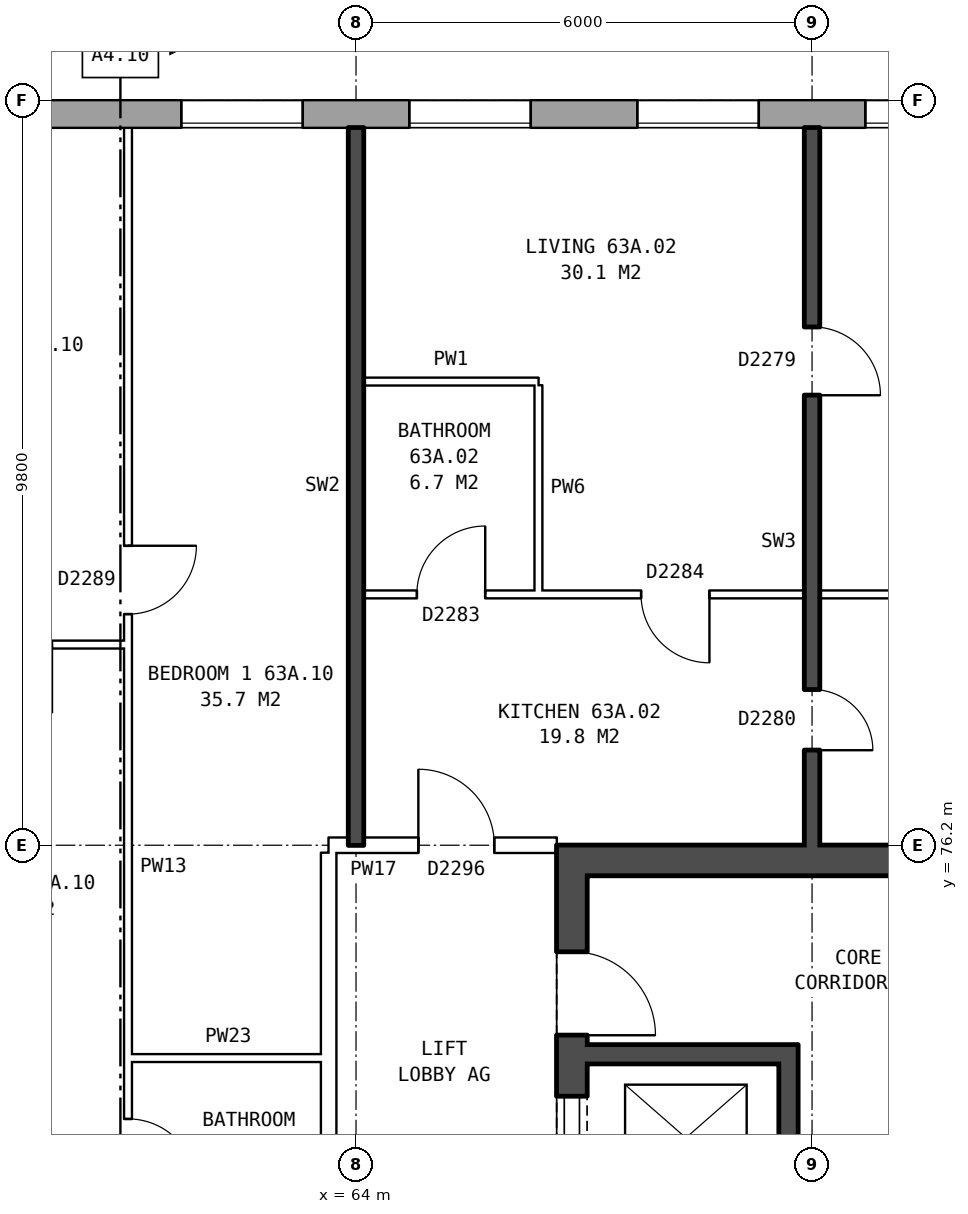
"""IFC4 building model, lengths in metres.
Left out: names, types, materials, properties, quantities, classifications, styles, units other than length and angle.
Written with IfcOpenShell. Run it as: python <this file> out.ifc"""

import sys

from ifc_helpers import new_model, si_unit, direction, frame, frame_2d, origin, place, context, subcontext, project, spatial, rectangle, extrude, element, fill, save


model = new_model("IFC4")
c1 = context("Model", 3, precision=1e-05, world=origin(), true_north=direction((0.0, 1.0)))
c2 = subcontext(c1, "Body", "Model", "MODEL_VIEW")
j1 = project(units=[si_unit("LENGTHUNIT", "METRE"), si_unit("PLANEANGLEUNIT", "RADIAN")], contexts=[c1])
p1 = place(None, origin())
s1 = spatial("IfcSite", under=j1, at=p1, CompositionType="ELEMENT")
p2 = place(p1, origin())
s2 = spatial("IfcBuilding", under=s1, at=p2, CompositionType="ELEMENT")
p3 = place(p2, frame((0.0, 0.0, 224.5)))
s3 = spatial("IfcBuildingStorey", under=s2, at=p3, CompositionType="ELEMENT", Elevation=224.5)
p4 = place(p3, frame((74.95, 85.82, 0.0), z_axis=(0.0, 0.0, 1.0), x_axis=(-1.0, 0.0, 0.0)))
e1 = element("IfcWall", 1, at=p4, inside=s3, PredefinedType="STANDARD", context=c2, shape_type="SweptSolid", body=[
    extrude(rectangle(XDim=39.875, YDim=0.36, at=frame_2d((19.938, 0.0))), origin(), (0.0, 0.0, 1.0), 2.85),
])
p5 = place(p4, frame((2.65, 0.0, 0.8)))
e2 = element("IfcOpeningElement", 2, at=p5, cuts=e1, PredefinedType="OPENING", context=c2, shape_type="SweptSolid", body=[
    extrude(rectangle(XDim=1.6, YDim=1.8, at=frame_2d((0.8, 0.9))), frame((0.0, 0.19, 0.0), z_axis=(0.0, -1.0, 0.0), x_axis=(1.0, 0.0, 0.0)), (0.0, 0.0, 1.0), 0.38),
])
p6 = place(p4, frame((5.65, 0.0, 0.8)))
e3 = element("IfcOpeningElement", 3, at=p6, cuts=e1, PredefinedType="OPENING", context=c2, shape_type="SweptSolid", body=[
    extrude(rectangle(XDim=1.6, YDim=1.8, at=frame_2d((0.8, 0.9))), frame((0.0, 0.19, 0.0), z_axis=(0.0, -1.0, 0.0), x_axis=(1.0, 0.0, 0.0)), (0.0, 0.0, 1.0), 0.38),
])
p7 = place(p4, frame((8.65, 0.0, 0.8)))
e4 = element("IfcOpeningElement", 4, at=p7, cuts=e1, PredefinedType="OPENING", context=c2, shape_type="SweptSolid", body=[
    extrude(rectangle(XDim=1.6, YDim=1.8, at=frame_2d((0.8, 0.9))), frame((0.0, 0.19, 0.0), z_axis=(0.0, -1.0, 0.0), x_axis=(1.0, 0.0, 0.0)), (0.0, 0.0, 1.0), 0.38),
])
p8 = place(p4, frame((11.65, 0.0, 0.8)))
e5 = element("IfcOpeningElement", 5, at=p8, cuts=e1, PredefinedType="OPENING", context=c2, shape_type="SweptSolid", body=[
    extrude(rectangle(XDim=1.6, YDim=1.8, at=frame_2d((0.8, 0.9))), frame((0.0, 0.19, 0.0), z_axis=(0.0, -1.0, 0.0), x_axis=(1.0, 0.0, 0.0)), (0.0, 0.0, 1.0), 0.38),
])
p9 = place(p4, frame((15.55, 0.0, 0.8)))
e6 = element("IfcOpeningElement", 6, at=p9, cuts=e1, PredefinedType="OPENING", context=c2, shape_type="SweptSolid", body=[
    extrude(rectangle(XDim=1.2, YDim=1.8, at=frame_2d((0.6, 0.9))), frame((0.0, 0.19, 0.0), z_axis=(0.0, -1.0, 0.0), x_axis=(1.0, 0.0, 0.0)), (0.0, 0.0, 1.0), 0.38),
])
p10 = place(p4, frame((17.65, 0.0, 0.8)))
e7 = element("IfcOpeningElement", 7, at=p10, cuts=e1, PredefinedType="OPENING", context=c2, shape_type="SweptSolid", body=[
    extrude(rectangle(XDim=1.6, YDim=1.8, at=frame_2d((0.8, 0.9))), frame((0.0, 0.19, 0.0), z_axis=(0.0, -1.0, 0.0), x_axis=(1.0, 0.0, 0.0)), (0.0, 0.0, 1.0), 0.38),
])
p11 = place(p4, frame((20.65, 0.0, 0.8)))
e8 = element("IfcOpeningElement", 8, at=p11, cuts=e1, PredefinedType="OPENING", context=c2, shape_type="SweptSolid", body=[
    extrude(rectangle(XDim=1.6, YDim=1.8, at=frame_2d((0.8, 0.9))), frame((0.0, 0.19, 0.0), z_axis=(0.0, -1.0, 0.0), x_axis=(1.0, 0.0, 0.0)), (0.0, 0.0, 1.0), 0.38),
])
p12 = place(p4, frame((23.65, 0.0, 0.8)))
e9 = element("IfcOpeningElement", 9, at=p12, cuts=e1, PredefinedType="OPENING", context=c2, shape_type="SweptSolid", body=[
    extrude(rectangle(XDim=1.6, YDim=1.8, at=frame_2d((0.8, 0.9))), frame((0.0, 0.19, 0.0), z_axis=(0.0, -1.0, 0.0), x_axis=(1.0, 0.0, 0.0)), (0.0, 0.0, 1.0), 0.38),
])
p13 = place(p4, frame((26.1, 0.0, 0.25)))
e10 = element("IfcOpeningElement", 10, at=p13, cuts=e1, PredefinedType="OPENING", context=c2, shape_type="SweptSolid", body=[
    extrude(rectangle(XDim=0.8, YDim=1.5, at=frame_2d((0.4, 0.75))), frame((0.0, 0.19, 0.0), z_axis=(0.0, -1.0, 0.0), x_axis=(1.0, 0.0, 0.0)), (0.0, 0.0, 1.0), 0.38),
])
p14 = place(p4, frame((29.65, 0.0, 0.8)))
e11 = element("IfcOpeningElement", 11, at=p14, cuts=e1, PredefinedType="OPENING", context=c2, shape_type="SweptSolid", body=[
    extrude(rectangle(XDim=1.6, YDim=1.8, at=frame_2d((0.8, 0.9))), frame((0.0, 0.19, 0.0), z_axis=(0.0, -1.0, 0.0), x_axis=(1.0, 0.0, 0.0)), (0.0, 0.0, 1.0), 0.38),
])
p15 = place(p4, frame((32.65, 0.0, 0.8)))
e12 = element("IfcOpeningElement", 12, at=p15, cuts=e1, PredefinedType="OPENING", context=c2, shape_type="SweptSolid", body=[
    extrude(rectangle(XDim=1.6, YDim=1.8, at=frame_2d((0.8, 0.9))), frame((0.0, 0.19, 0.0), z_axis=(0.0, -1.0, 0.0), x_axis=(1.0, 0.0, 0.0)), (0.0, 0.0, 1.0), 0.38),
])
p16 = place(p4, frame((35.65, 0.0, 0.8)))
e13 = element("IfcOpeningElement", 13, at=p16, cuts=e1, PredefinedType="OPENING", context=c2, shape_type="SweptSolid", body=[
    extrude(rectangle(XDim=1.6, YDim=1.8, at=frame_2d((0.8, 0.9))), frame((0.0, 0.19, 0.0), z_axis=(0.0, -1.0, 0.0), x_axis=(1.0, 0.0, 0.0)), (0.0, 0.0, 1.0), 0.38),
])
p17 = place(p4, frame((28.15, 0.0, 1.65)))
e14 = element("IfcOpeningElement", 14, at=p17, cuts=e1, PredefinedType="OPENING", context=c2, shape_type="SweptSolid", body=[
    extrude(rectangle(XDim=0.6, YDim=0.9, at=frame_2d((0.3, 0.45))), frame((0.0, 0.19, 0.0), z_axis=(0.0, -1.0, 0.0), x_axis=(1.0, 0.0, 0.0)), (0.0, 0.0, 1.0), 0.38),
])
p18 = place(p3, frame((66.84, 63.8, 0.0), z_axis=(0.0, 0.0, 1.0), x_axis=(0.0, 1.0, 0.0)))
e15 = element("IfcWall", 15, at=p18, inside=s3, PredefinedType="SHEAR", context=c2, shape_type="SweptSolid", body=[
    extrude(rectangle(XDim=12.4, YDim=0.4, at=frame_2d((6.2, 0.0))), origin(), (0.0, 0.0, 1.0), 2.85),
])
p19 = place(p18, frame((1.325, 0.0, 0.0)))
e16 = element("IfcOpeningElement", 16, at=p19, cuts=e15, PredefinedType="OPENING", context=c2, shape_type="SweptSolid", body=[
    extrude(rectangle(XDim=1.1, YDim=2.1, at=frame_2d((0.55, 1.05))), frame((0.0, 0.21, 0.0), z_axis=(0.0, -1.0, 0.0), x_axis=(1.0, 0.0, 0.0)), (0.0, 0.0, 1.0), 0.42),
])
p20 = place(p18, frame((3.6, 0.0, 0.0)))
e17 = element("IfcOpeningElement", 17, at=p20, cuts=e15, PredefinedType="OPENING", context=c2, shape_type="SweptSolid", body=[
    extrude(rectangle(XDim=1.1, YDim=2.1, at=frame_2d((0.55, 1.05))), frame((0.0, 0.21, 0.0), z_axis=(0.0, -1.0, 0.0), x_axis=(1.0, 0.0, 0.0)), (0.0, 0.0, 1.0), 0.42),
])
p21 = place(p18, frame((5.8, 0.0, 0.0)))
e18 = element("IfcOpeningElement", 18, at=p21, cuts=e15, PredefinedType="OPENING", context=c2, shape_type="SweptSolid", body=[
    extrude(rectangle(XDim=1.1, YDim=2.1, at=frame_2d((0.55, 1.05))), frame((0.0, 0.21, 0.0), z_axis=(0.0, -1.0, 0.0), x_axis=(1.0, 0.0, 0.0)), (0.0, 0.0, 1.0), 0.42),
])
p22 = place(p18, frame((8.0, 0.0, 0.0)))
e19 = element("IfcOpeningElement", 19, at=p22, cuts=e15, PredefinedType="OPENING", context=c2, shape_type="SweptSolid", body=[
    extrude(rectangle(XDim=1.1, YDim=2.1, at=frame_2d((0.55, 1.05))), frame((0.0, 0.21, 0.0), z_axis=(0.0, -1.0, 0.0), x_axis=(1.0, 0.0, 0.0)), (0.0, 0.0, 1.0), 0.42),
])
p23 = place(p18, frame((9.9, 0.0, 0.0)))
e20 = element("IfcOpeningElement", 20, at=p23, cuts=e15, PredefinedType="OPENING", context=c2, shape_type="SweptSolid", body=[
    extrude(rectangle(XDim=1.1, YDim=2.1, at=frame_2d((0.55, 1.05))), frame((0.0, 0.21, 0.0), z_axis=(0.0, -1.0, 0.0), x_axis=(1.0, 0.0, 0.0)), (0.0, 0.0, 1.0), 0.42),
])
p24 = place(p3, frame((67.04, 76.0, 0.0), z_axis=(0.0, 0.0, 1.0), x_axis=(1.0, 0.0, 0.0)))
e21 = element("IfcWall", 21, at=p24, inside=s3, PredefinedType="SHEAR", context=c2, shape_type="SweptSolid", body=[
    extrude(rectangle(XDim=8.2, YDim=0.4, at=frame_2d((4.1, 0.0))), origin(), (0.0, 0.0, 1.0), 2.85),
])
p25 = place(p3, frame((67.04, 73.45, 0.0), z_axis=(0.0, 0.0, 1.0), x_axis=(1.0, 0.0, 0.0)))
e22 = element("IfcWall", 22, at=p25, inside=s3, PredefinedType="SHEAR", context=c2, shape_type="SweptSolid", body=[
    extrude(rectangle(XDim=2.525, YDim=0.25, at=frame_2d((1.262, 0.0))), origin(), (0.0, 0.0, 1.0), 2.85),
])
p26 = place(p3, frame((69.69, 66.975, 0.0), z_axis=(0.0, 0.0, 1.0), x_axis=(0.0, 1.0, 0.0)))
e23 = element("IfcWall", 23, at=p26, inside=s3, PredefinedType="SHEAR", context=c2, shape_type="SweptSolid", body=[
    extrude(rectangle(XDim=6.6, YDim=0.25, at=frame_2d((3.3, 0.0))), origin(), (0.0, 0.0, 1.0), 2.85),
])
p27 = place(p3, frame((63.64, 63.9, 0.0), z_axis=(0.0, 0.0, 1.0), x_axis=(0.0, 1.0, 0.0)))
e24 = element("IfcWall", 24, at=p27, inside=s3, PredefinedType="PARTITIONING", context=c2, shape_type="SweptSolid", body=[
    extrude(rectangle(XDim=12.2, YDim=0.2, at=frame_2d((6.1, 0.0))), origin(), (0.0, 0.0, 1.0), 2.85),
])
p28 = place(p27, frame((5.1, 0.0, 0.0)))
e25 = element("IfcOpeningElement", 25, at=p28, cuts=e24, PredefinedType="OPENING", context=c2, shape_type="SweptSolid", body=[
    extrude(rectangle(XDim=2.0, YDim=2.1, at=frame_2d((1.0, 1.05))), frame((0.0, 0.11, 0.0), z_axis=(0.0, -1.0, 0.0), x_axis=(1.0, 0.0, 0.0)), (0.0, 0.0, 1.0), 0.22),
])
p29 = place(p3, frame((61.0, 73.4, 0.0), z_axis=(0.0, 0.0, 1.0), x_axis=(1.0, 0.0, 0.0)))
e26 = element("IfcWall", 26, at=p29, inside=s3, PredefinedType="PARTITIONING", context=c2, shape_type="SweptSolid", body=[
    extrude(rectangle(XDim=2.64, YDim=0.1, at=frame_2d((1.32, 0.0))), origin(), (0.0, 0.0, 1.0), 2.85),
])
p30 = place(p3, frame((63.64, 76.2, 0.0), z_axis=(0.0, 0.0, 1.0), x_axis=(1.0, 0.0, 0.0)))
e27 = element("IfcWall", 27, at=p30, inside=s3, PredefinedType="PARTITIONING", context=c2, shape_type="SweptSolid", body=[
    extrude(rectangle(XDim=3.0, YDim=0.2, at=frame_2d((1.5, 0.0))), origin(), (0.0, 0.0, 1.0), 2.85),
])
p31 = place(p30, frame((1.18, 0.0, 0.0)))
e28 = element("IfcOpeningElement", 28, at=p31, cuts=e27, PredefinedType="OPENING", context=c2, shape_type="SweptSolid", body=[
    extrude(rectangle(XDim=1.0, YDim=2.1, at=frame_2d((0.5, 1.05))), frame((0.0, 0.11, 0.0), z_axis=(0.0, -1.0, 0.0), x_axis=(1.0, 0.0, 0.0)), (0.0, 0.0, 1.0), 0.22),
])
p32 = place(p3, frame((58.1, 78.84, 0.0), z_axis=(0.0, 0.0, 1.0), x_axis=(1.0, 0.0, 0.0)))
e29 = element("IfcWall", 29, at=p32, inside=s3, PredefinedType="PARTITIONING", context=c2, shape_type="SweptSolid", body=[
    extrude(rectangle(XDim=2.9, YDim=0.1, at=frame_2d((1.45, 0.0))), origin(), (0.0, 0.0, 1.0), 2.85),
])
p33 = place(p32, frame((1.0, 0.0, 0.0)))
e30 = element("IfcOpeningElement", 30, at=p33, cuts=e29, PredefinedType="OPENING", context=c2, shape_type="SweptSolid", body=[
    extrude(rectangle(XDim=0.9, YDim=2.1, at=frame_2d((0.45, 1.05))), frame((0.0, 0.06, 0.0), z_axis=(0.0, -1.0, 0.0), x_axis=(1.0, 0.0, 0.0)), (0.0, 0.0, 1.0), 0.12),
])
p34 = place(p3, frame((64.1, 79.5, 0.0), z_axis=(0.0, 0.0, 1.0), x_axis=(1.0, 0.0, 0.0)))
e31 = element("IfcWall", 31, at=p34, inside=s3, PredefinedType="PARTITIONING", context=c2, shape_type="SweptSolid", body=[
    extrude(rectangle(XDim=11.8, YDim=0.1, at=frame_2d((5.9, 0.0))), origin(), (0.0, 0.0, 1.0), 2.85),
])
p35 = place(p34, frame((3.65, 0.0, 0.0)))
e32 = element("IfcOpeningElement", 32, at=p35, cuts=e31, PredefinedType="OPENING", context=c2, shape_type="SweptSolid", body=[
    extrude(rectangle(XDim=0.9, YDim=2.1, at=frame_2d((0.45, 1.05))), frame((0.0, 0.06, 0.0), z_axis=(0.0, -1.0, 0.0), x_axis=(1.0, 0.0, 0.0)), (0.0, 0.0, 1.0), 0.12),
])
p36 = place(p34, frame((0.7, 0.0, 0.0)))
e33 = element("IfcOpeningElement", 33, at=p36, cuts=e31, PredefinedType="OPENING", context=c2, shape_type="SweptSolid", body=[
    extrude(rectangle(XDim=0.9, YDim=2.1, at=frame_2d((0.45, 1.05))), frame((0.0, 0.06, 0.0), z_axis=(0.0, -1.0, 0.0), x_axis=(1.0, 0.0, 0.0)), (0.0, 0.0, 1.0), 0.12),
])
p37 = place(p3, frame((64.1, 82.3, 0.0), z_axis=(0.0, 0.0, 1.0), x_axis=(1.0, 0.0, 0.0)))
e34 = element("IfcWall", 34, at=p37, inside=s3, PredefinedType="PARTITIONING", context=c2, shape_type="SweptSolid", body=[
    extrude(rectangle(XDim=2.3, YDim=0.1, at=frame_2d((1.15, 0.0))), origin(), (0.0, 0.0, 1.0), 2.85),
])
p38 = place(p3, frame((61.0, 71.3, 0.0), z_axis=(0.0, 0.0, 1.0), x_axis=(0.0, 1.0, 0.0)))
e35 = element("IfcWall", 35, at=p38, inside=s3, PredefinedType="PARTITIONING", context=c2, shape_type="SweptSolid", body=[
    extrude(rectangle(XDim=14.34, YDim=0.1, at=frame_2d((7.17, 0.0))), origin(), (0.0, 0.0, 1.0), 2.85),
])
p39 = place(p38, frame((7.94, 0.0, 0.0)))
e36 = element("IfcOpeningElement", 36, at=p39, cuts=e35, PredefinedType="OPENING", context=c2, shape_type="SweptSolid", body=[
    extrude(rectangle(XDim=0.9, YDim=2.1, at=frame_2d((0.45, 1.05))), frame((0.0, 0.06, 0.0), z_axis=(0.0, -1.0, 0.0), x_axis=(1.0, 0.0, 0.0)), (0.0, 0.0, 1.0), 0.12),
])
p40 = place(p38, frame((0.4, 0.0, 0.0)))
e37 = element("IfcOpeningElement", 37, at=p40, cuts=e35, PredefinedType="OPENING", context=c2, shape_type="SweptSolid", body=[
    extrude(rectangle(XDim=0.9, YDim=2.1, at=frame_2d((0.45, 1.05))), frame((0.0, 0.06, 0.0), z_axis=(0.0, -1.0, 0.0), x_axis=(1.0, 0.0, 0.0)), (0.0, 0.0, 1.0), 0.12),
])
p41 = place(p3, frame((64.0, 76.2, 0.0), z_axis=(0.0, 0.0, 1.0), x_axis=(0.0, 1.0, 0.0)))
e38 = element("IfcWall", 38, at=p41, inside=s3, PredefinedType="SOLIDWALL", context=c2, shape_type="SweptSolid", body=[
    extrude(rectangle(XDim=9.44, YDim=0.2, at=frame_2d((4.72, 0.0))), origin(), (0.0, 0.0, 1.0), 2.85),
])
p42 = place(p3, frame((66.4, 79.55, 0.0), z_axis=(0.0, 0.0, 1.0), x_axis=(0.0, 1.0, 0.0)))
e39 = element("IfcWall", 39, at=p42, inside=s3, PredefinedType="PARTITIONING", context=c2, shape_type="SweptSolid", body=[
    extrude(rectangle(XDim=2.7, YDim=0.1, at=frame_2d((1.35, 0.0))), origin(), (0.0, 0.0, 1.0), 2.85),
])
p43 = place(p3, frame((70.0, 76.2, 0.0), z_axis=(0.0, 0.0, 1.0), x_axis=(0.0, 1.0, 0.0)))
e40 = element("IfcWall", 40, at=p43, inside=s3, PredefinedType="SOLIDWALL", context=c2, shape_type="SweptSolid", body=[
    extrude(rectangle(XDim=9.44, YDim=0.2, at=frame_2d((4.72, 0.0))), origin(), (0.0, 0.0, 1.0), 2.85),
])
p44 = place(p43, frame((5.92, 0.0, 0.0)))
e41 = element("IfcOpeningElement", 41, at=p44, cuts=e40, PredefinedType="OPENING", context=c2, shape_type="SweptSolid", body=[
    extrude(rectangle(XDim=0.9, YDim=2.1, at=frame_2d((0.45, 1.05))), frame((0.0, 0.11, 0.0), z_axis=(0.0, -1.0, 0.0), x_axis=(1.0, 0.0, 0.0)), (0.0, 0.0, 1.0), 0.22),
])
p45 = place(p43, frame((1.25, 0.0, 0.0)))
e42 = element("IfcOpeningElement", 42, at=p45, cuts=e40, PredefinedType="OPENING", context=c2, shape_type="SweptSolid", body=[
    extrude(rectangle(XDim=0.8, YDim=2.1, at=frame_2d((0.4, 1.05))), frame((0.0, 0.11, 0.0), z_axis=(0.0, -1.0, 0.0), x_axis=(1.0, 0.0, 0.0)), (0.0, 0.0, 1.0), 0.22),
])
p46 = place(p5, origin())
e43 = element("IfcWindow", 43, at=p46, inside=s3, PartitioningType="SINGLE_PANEL", PredefinedType="WINDOW", context=c2, shape_type="SweptSolid", body=[
    extrude(rectangle(XDim=1.6, YDim=1.8, at=frame_2d((0.8, 0.9))), frame((0.0, 0.15, 0.0), z_axis=(0.0, -1.0, 0.0), x_axis=(1.0, 0.0, 0.0)), (0.0, 0.0, 1.0), 0.06),
])
fill(e2, e43)
p47 = place(p6, origin())
e44 = element("IfcWindow", 44, at=p47, inside=s3, PartitioningType="SINGLE_PANEL", PredefinedType="WINDOW", context=c2, shape_type="SweptSolid", body=[
    extrude(rectangle(XDim=1.6, YDim=1.8, at=frame_2d((0.8, 0.9))), frame((0.0, 0.15, 0.0), z_axis=(0.0, -1.0, 0.0), x_axis=(1.0, 0.0, 0.0)), (0.0, 0.0, 1.0), 0.06),
])
fill(e3, e44)
p48 = place(p7, origin())
e45 = element("IfcWindow", 45, at=p48, inside=s3, PartitioningType="SINGLE_PANEL", PredefinedType="WINDOW", context=c2, shape_type="SweptSolid", body=[
    extrude(rectangle(XDim=1.6, YDim=1.8, at=frame_2d((0.8, 0.9))), frame((0.0, 0.15, 0.0), z_axis=(0.0, -1.0, 0.0), x_axis=(1.0, 0.0, 0.0)), (0.0, 0.0, 1.0), 0.06),
])
fill(e4, e45)
p49 = place(p8, origin())
e46 = element("IfcWindow", 46, at=p49, inside=s3, PartitioningType="SINGLE_PANEL", PredefinedType="WINDOW", context=c2, shape_type="SweptSolid", body=[
    extrude(rectangle(XDim=1.6, YDim=1.8, at=frame_2d((0.8, 0.9))), frame((0.0, 0.15, 0.0), z_axis=(0.0, -1.0, 0.0), x_axis=(1.0, 0.0, 0.0)), (0.0, 0.0, 1.0), 0.06),
])
fill(e5, e46)
p50 = place(p22, origin())
e47 = element("IfcDoor", 47, at=p50, inside=s3, OperationType="DOUBLE_DOOR_SLIDING", PredefinedType="DOOR", context=c2, shape_type="SweptSolid", body=[
    extrude(rectangle(XDim=1.1, YDim=2.1, at=frame_2d((0.55, 1.05))), frame((0.0, -0.135, 0.0), z_axis=(0.0, -1.0, 0.0), x_axis=(1.0, 0.0, 0.0)), (0.0, 0.0, 1.0), 0.05),
])
fill(e19, e47)
p51 = place(p23, frame((1.1, 0.0, 0.0), z_axis=(0.0, 0.0, 1.0), x_axis=(-1.0, 0.0, 0.0)))
e48 = element("IfcDoor", 48, at=p51, inside=s3, OperationType="SINGLE_SWING_RIGHT", PredefinedType="DOOR", context=c2, shape_type="SweptSolid", body=[
    extrude(rectangle(XDim=1.1, YDim=2.1, at=frame_2d((0.55, 1.05))), frame((0.0, 0.185, 0.0), z_axis=(0.0, -1.0, 0.0), x_axis=(1.0, 0.0, 0.0)), (0.0, 0.0, 1.0), 0.05),
])
fill(e20, e48)
p52 = place(p44, frame((0.9, 0.0, 0.0), z_axis=(0.0, 0.0, 1.0), x_axis=(-1.0, 0.0, 0.0)))
e49 = element("IfcDoor", 49, at=p52, inside=s3, OperationType="SINGLE_SWING_RIGHT", PredefinedType="DOOR", context=c2, shape_type="SweptSolid", body=[
    extrude(rectangle(XDim=0.9, YDim=2.1, at=frame_2d((0.45, 1.05))), frame((0.0, 0.025, 0.0), z_axis=(0.0, -1.0, 0.0), x_axis=(1.0, 0.0, 0.0)), (0.0, 0.0, 1.0), 0.05),
])
fill(e41, e49)
p53 = place(p31, origin())
e50 = element("IfcDoor", 50, at=p53, inside=s3, OperationType="SINGLE_SWING_LEFT", PredefinedType="DOOR", context=c2, shape_type="SweptSolid", body=[
    extrude(rectangle(XDim=1.0, YDim=2.1, at=frame_2d((0.5, 1.05))), frame((0.0, 0.025, 0.0), z_axis=(0.0, -1.0, 0.0), x_axis=(1.0, 0.0, 0.0)), (0.0, 0.0, 1.0), 0.05),
])
fill(e28, e50)
p54 = place(p35, frame((0.9, 0.0, 0.0), z_axis=(0.0, 0.0, 1.0), x_axis=(-1.0, 0.0, 0.0)))
e51 = element("IfcDoor", 51, at=p54, inside=s3, OperationType="SINGLE_SWING_LEFT", PredefinedType="DOOR", context=c2, shape_type="SweptSolid", body=[
    extrude(rectangle(XDim=0.9, YDim=2.1, at=frame_2d((0.45, 1.05))), frame((0.0, 0.025, 0.0), z_axis=(0.0, -1.0, 0.0), x_axis=(1.0, 0.0, 0.0)), (0.0, 0.0, 1.0), 0.05),
])
fill(e32, e51)
p55 = place(p45, frame((0.8, 0.0, 0.0), z_axis=(0.0, 0.0, 1.0), x_axis=(-1.0, 0.0, 0.0)))
e52 = element("IfcDoor", 52, at=p55, inside=s3, OperationType="SINGLE_SWING_RIGHT", PredefinedType="DOOR", context=c2, shape_type="SweptSolid", body=[
    extrude(rectangle(XDim=0.8, YDim=2.1, at=frame_2d((0.4, 1.05))), frame((0.0, 0.025, 0.0), z_axis=(0.0, -1.0, 0.0), x_axis=(1.0, 0.0, 0.0)), (0.0, 0.0, 1.0), 0.05),
])
fill(e42, e52)
p56 = place(p36, origin())
e53 = element("IfcDoor", 53, at=p56, inside=s3, OperationType="SINGLE_SWING_RIGHT", PredefinedType="DOOR", context=c2, shape_type="SweptSolid", body=[
    extrude(rectangle(XDim=0.9, YDim=2.1, at=frame_2d((0.45, 1.05))), frame((0.0, 0.025, 0.0), z_axis=(0.0, -1.0, 0.0), x_axis=(1.0, 0.0, 0.0)), (0.0, 0.0, 1.0), 0.05),
])
fill(e33, e53)
p57 = place(p39, frame((0.9, 0.0, 0.0), z_axis=(0.0, 0.0, 1.0), x_axis=(-1.0, 0.0, 0.0)))
e54 = element("IfcDoor", 54, at=p57, inside=s3, OperationType="SINGLE_SWING_LEFT", PredefinedType="DOOR", context=c2, shape_type="SweptSolid", body=[
    extrude(rectangle(XDim=0.9, YDim=2.1, at=frame_2d((0.45, 1.05))), frame((0.0, 0.025, 0.0), z_axis=(0.0, -1.0, 0.0), x_axis=(1.0, 0.0, 0.0)), (0.0, 0.0, 1.0), 0.05),
])
fill(e36, e54)
p58 = place(p40, frame((0.9, 0.0, 0.0), z_axis=(0.0, 0.0, 1.0), x_axis=(-1.0, 0.0, 0.0)))
e55 = element("IfcDoor", 55, at=p58, inside=s3, OperationType="SINGLE_SWING_RIGHT", PredefinedType="DOOR", context=c2, shape_type="SweptSolid", body=[
    extrude(rectangle(XDim=0.9, YDim=2.1, at=frame_2d((0.45, 1.05))), frame((0.0, 0.025, 0.0), z_axis=(0.0, -1.0, 0.0), x_axis=(1.0, 0.0, 0.0)), (0.0, 0.0, 1.0), 0.05),
])
fill(e37, e55)
save(model, sys.argv[1])
